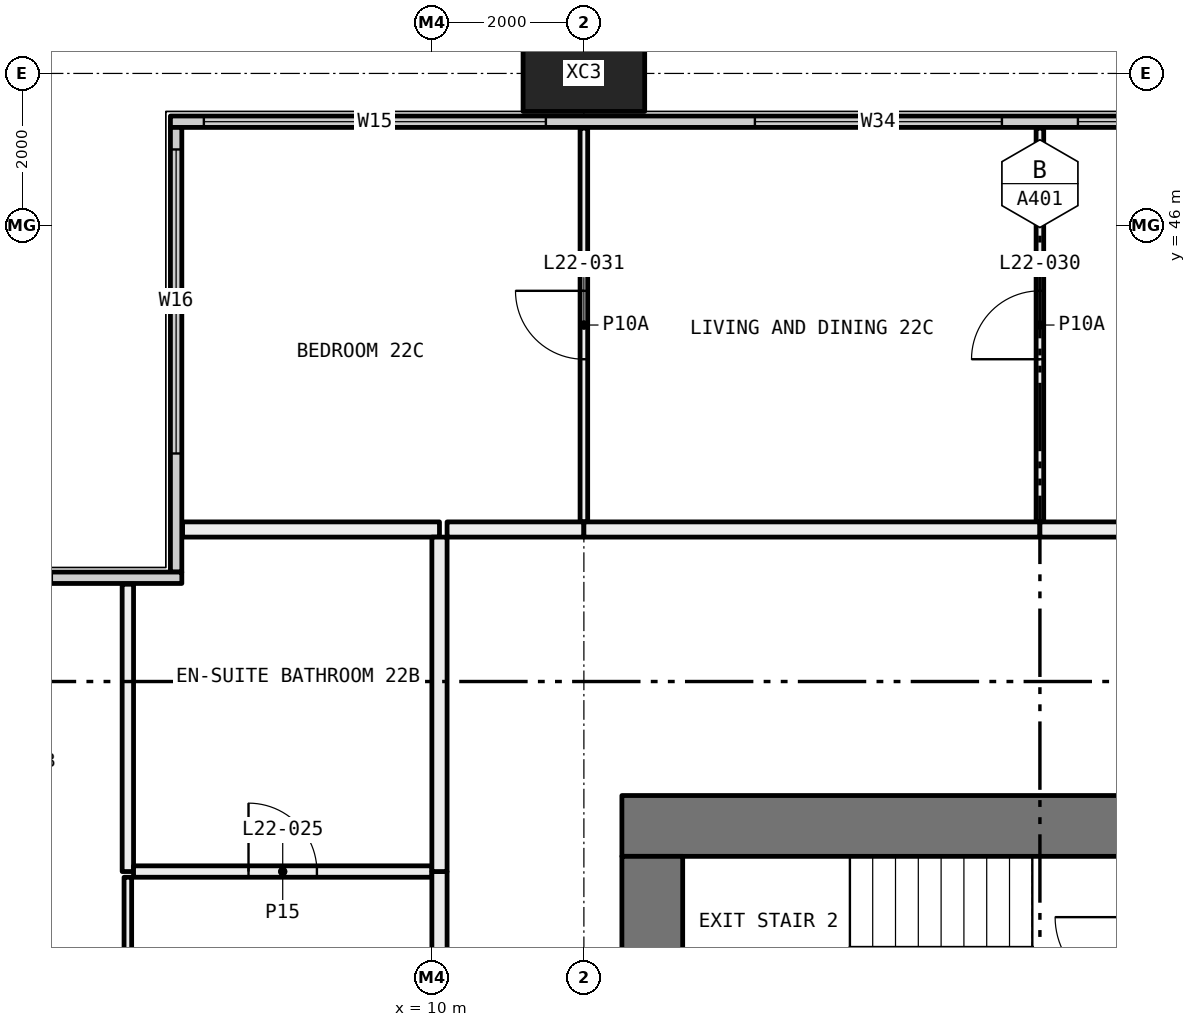
"""IFC4 building model, lengths in metres.
Left out: names, types, materials, properties, quantities, classifications, styles, units other than length and angle.
Written with IfcOpenShell. Run it as: python <this file> out.ifc"""

import sys

from ifc_helpers import new_model, si_unit, direction, frame, frame_2d, origin, origin_2d, place, context, subcontext, project, spatial, rectangle, hollow_rectangle, extrude, element, fill, save


model = new_model("IFC4")
c1 = context("Model", 3, precision=1e-05, world=origin(), true_north=direction((0.0, 1.0)))
c2 = subcontext(c1, "Body", "Model", "MODEL_VIEW")
j1 = project(units=[si_unit("LENGTHUNIT", "METRE"), si_unit("PLANEANGLEUNIT", "RADIAN")], contexts=[c1])
p1 = place(None, origin())
s1 = spatial("IfcSite", under=j1, at=p1, CompositionType="ELEMENT")
p2 = place(p1, origin())
s2 = spatial("IfcBuilding", under=s1, at=p2, CompositionType="ELEMENT")
p3 = place(p2, frame((0.0, 0.0, 88.65)))
s3 = spatial("IfcBuildingStorey", under=s2, at=p3, CompositionType="ELEMENT", Elevation=88.65)
p4 = place(p3, frame((12.0, 48.0, -0.4), z_axis=(0.0, 0.0, 1.0), x_axis=(1.0, 0.0, 0.0)))
e1 = element("IfcColumn", 1, at=p4, inside=s3, PredefinedType="COLUMN", context=c2, shape_type="SweptSolid", body=[
    extrude(hollow_rectangle(XDim=1.6, YDim=1.0, WallThickness=0.065, at=origin_2d()), origin(), (0.0, 0.0, 1.0), 3.45),
])
p5 = place(p3, frame((6.56, 47.365, 0.0), z_axis=(0.0, 0.0, 1.0), x_axis=(1.0, 0.0, 0.0)))
e2 = element("IfcWall", 2, at=p5, inside=s3, PredefinedType="ELEMENTEDWALL", context=c2, shape_type="SweptSolid", body=[
    extrude(rectangle(XDim=58.88, YDim=0.15, at=frame_2d((29.44, 0.0))), origin(), (0.0, 0.0, 1.0), 3.05),
])
p6 = place(p5, frame((0.44, 0.0, 0.45)))
e3 = element("IfcOpeningElement", 3, at=p6, cuts=e2, PredefinedType="OPENING", context=c2, shape_type="SweptSolid", body=[
    extrude(rectangle(XDim=4.5, YDim=2.55, at=frame_2d((2.25, 1.275))), frame((0.0, 0.085, 0.0), z_axis=(0.0, -1.0, 0.0), x_axis=(1.0, 0.0, 0.0)), (0.0, 0.0, 1.0), 0.17),
])
p7 = place(p5, frame((7.69, 0.0, 0.45)))
e4 = element("IfcOpeningElement", 4, at=p7, cuts=e2, PredefinedType="OPENING", context=c2, shape_type="SweptSolid", body=[
    extrude(rectangle(XDim=3.25, YDim=2.55, at=frame_2d((1.625, 1.275))), frame((0.0, 0.085, 0.0), z_axis=(0.0, -1.0, 0.0), x_axis=(1.0, 0.0, 0.0)), (0.0, 0.0, 1.0), 0.17),
])
p8 = place(p5, frame((11.94, 0.0, 0.45)))
e5 = element("IfcOpeningElement", 5, at=p8, cuts=e2, PredefinedType="OPENING", context=c2, shape_type="SweptSolid", body=[
    extrude(rectangle(XDim=3.25, YDim=2.55, at=frame_2d((1.625, 1.275))), frame((0.0, 0.085, 0.0), z_axis=(0.0, -1.0, 0.0), x_axis=(1.0, 0.0, 0.0)), (0.0, 0.0, 1.0), 0.17),
])
p9 = place(p5, frame((19.69, 0.0, 0.45)))
e6 = element("IfcOpeningElement", 6, at=p9, cuts=e2, PredefinedType="OPENING", context=c2, shape_type="SweptSolid", body=[
    extrude(rectangle(XDim=3.25, YDim=2.55, at=frame_2d((1.625, 1.275))), frame((0.0, 0.085, 0.0), z_axis=(0.0, -1.0, 0.0), x_axis=(1.0, 0.0, 0.0)), (0.0, 0.0, 1.0), 0.17),
])
p10 = place(p5, frame((23.94, 0.0, 0.45)))
e7 = element("IfcOpeningElement", 7, at=p10, cuts=e2, PredefinedType="OPENING", context=c2, shape_type="SweptSolid", body=[
    extrude(rectangle(XDim=2.0, YDim=2.55, at=frame_2d((1.0, 1.275))), frame((0.0, 0.085, 0.0), z_axis=(0.0, -1.0, 0.0), x_axis=(1.0, 0.0, 0.0)), (0.0, 0.0, 1.0), 0.17),
])
p11 = place(p5, frame((31.69, 0.0, 0.45)))
e8 = element("IfcOpeningElement", 8, at=p11, cuts=e2, PredefinedType="OPENING", context=c2, shape_type="SweptSolid", body=[
    extrude(rectangle(XDim=3.25, YDim=2.55, at=frame_2d((1.625, 1.275))), frame((0.0, 0.085, 0.0), z_axis=(0.0, -1.0, 0.0), x_axis=(1.0, 0.0, 0.0)), (0.0, 0.0, 1.0), 0.17),
])
p12 = place(p5, frame((35.94, 0.0, 0.45)))
e9 = element("IfcOpeningElement", 9, at=p12, cuts=e2, PredefinedType="OPENING", context=c2, shape_type="SweptSolid", body=[
    extrude(rectangle(XDim=3.25, YDim=2.55, at=frame_2d((1.625, 1.275))), frame((0.0, 0.085, 0.0), z_axis=(0.0, -1.0, 0.0), x_axis=(1.0, 0.0, 0.0)), (0.0, 0.0, 1.0), 0.17),
])
p13 = place(p5, frame((43.69, 0.0, 0.45)))
e10 = element("IfcOpeningElement", 10, at=p13, cuts=e2, PredefinedType="OPENING", context=c2, shape_type="SweptSolid", body=[
    extrude(rectangle(XDim=3.25, YDim=2.55, at=frame_2d((1.625, 1.275))), frame((0.0, 0.085, 0.0), z_axis=(0.0, -1.0, 0.0), x_axis=(1.0, 0.0, 0.0)), (0.0, 0.0, 1.0), 0.17),
])
p14 = place(p5, frame((47.94, 0.0, 0.45)))
e11 = element("IfcOpeningElement", 11, at=p14, cuts=e2, PredefinedType="OPENING", context=c2, shape_type="SweptSolid", body=[
    extrude(rectangle(XDim=2.0, YDim=2.55, at=frame_2d((1.0, 1.275))), frame((0.0, 0.085, 0.0), z_axis=(0.0, -1.0, 0.0), x_axis=(1.0, 0.0, 0.0)), (0.0, 0.0, 1.0), 0.17),
])
p15 = place(p5, frame((53.94, 0.0, 0.45)))
e12 = element("IfcOpeningElement", 12, at=p15, cuts=e2, PredefinedType="OPENING", context=c2, shape_type="SweptSolid", body=[
    extrude(rectangle(XDim=4.5, YDim=2.55, at=frame_2d((2.25, 1.275))), frame((0.0, 0.085, 0.0), z_axis=(0.0, -1.0, 0.0), x_axis=(1.0, 0.0, 0.0)), (0.0, 0.0, 1.0), 0.17),
])
p16 = place(p3, frame((6.635, 41.44, 0.0), z_axis=(0.0, 0.0, 1.0), x_axis=(0.0, 1.0, 0.0)))
e13 = element("IfcWall", 13, at=p16, inside=s3, PredefinedType="ELEMENTEDWALL", context=c2, shape_type="SweptSolid", body=[
    extrude(rectangle(XDim=5.85, YDim=0.15, at=frame_2d((2.925, 0.0))), origin(), (0.0, 0.0, 1.0), 3.05),
])
p17 = place(p16, frame((1.56, 0.0, 0.45)))
e14 = element("IfcOpeningElement", 14, at=p17, cuts=e13, PredefinedType="OPENING", context=c2, shape_type="SweptSolid", body=[
    extrude(rectangle(XDim=4.0, YDim=2.55, at=frame_2d((2.0, 1.275))), frame((0.0, 0.085, 0.0), z_axis=(0.0, -1.0, 0.0), x_axis=(1.0, 0.0, 0.0)), (0.0, 0.0, 1.0), 0.17),
])
p18 = place(p3, frame((0.56, 41.365, 0.0), z_axis=(0.0, 0.0, 1.0), x_axis=(1.0, 0.0, 0.0)))
e15 = element("IfcWall", 15, at=p18, inside=s3, PredefinedType="ELEMENTEDWALL", context=c2, shape_type="SweptSolid", body=[
    extrude(rectangle(XDim=6.15, YDim=0.15, at=frame_2d((3.075, 0.0))), origin(), (0.0, 0.0, 1.0), 3.05),
])
p19 = place(p18, frame((0.44, 0.0, 0.45)))
e16 = element("IfcOpeningElement", 16, at=p19, cuts=e15, PredefinedType="OPENING", context=c2, shape_type="SweptSolid", body=[
    extrude(rectangle(XDim=4.0, YDim=2.55, at=frame_2d((2.0, 1.275))), frame((0.0, 0.085, 0.0), z_axis=(0.0, -1.0, 0.0), x_axis=(1.0, 0.0, 0.0)), (0.0, 0.0, 1.0), 0.17),
])
p20 = place(p3, frame((6.0, 36.05, 0.0), z_axis=(0.0, 0.0, 1.0), x_axis=(0.0, 1.0, 0.0)))
e17 = element("IfcWall", 17, at=p20, inside=s3, PredefinedType="PARTITIONING", context=c2, shape_type="SweptSolid", body=[
    extrude(rectangle(XDim=1.375, YDim=0.1, at=frame_2d((0.688, 0.0))), origin(), (0.0, 0.0, 1.0), 2.45),
])
p21 = place(p3, frame((6.0, 37.5, 0.0), z_axis=(0.0, 0.0, 1.0), x_axis=(0.0, 1.0, 0.0)))
e18 = element("IfcWall", 18, at=p21, inside=s3, PredefinedType="PARTITIONING", context=c2, shape_type="SweptSolid", body=[
    extrude(rectangle(XDim=3.78, YDim=0.15, at=frame_2d((1.89, 0.0))), origin(), (0.0, 0.0, 1.0), 3.05),
])
p22 = place(p3, frame((10.0, 37.5, 0.0), z_axis=(0.0, 0.0, 1.0), x_axis=(-1.0, 0.0, 0.0)))
e19 = element("IfcWall", 19, at=p22, inside=s3, PredefinedType="PARTITIONING", context=c2, shape_type="SweptSolid", body=[
    extrude(rectangle(XDim=3.925, YDim=0.15, at=frame_2d((1.962, 0.0))), origin(), (0.0, 0.0, 1.0), 3.05),
])
p23 = place(p22, frame((1.512, 0.0, 0.0)))
e20 = element("IfcOpeningElement", 20, at=p23, cuts=e19, PredefinedType="OPENING", context=c2, shape_type="SweptSolid", body=[
    extrude(rectangle(XDim=0.9, YDim=2.1, at=frame_2d((0.45, 1.05))), frame((0.0, 0.085, 0.0), z_axis=(0.0, -1.0, 0.0), x_axis=(1.0, 0.0, 0.0)), (0.0, 0.0, 1.0), 0.17),
])
p24 = place(p3, frame((10.1, 36.1, 0.0), z_axis=(0.0, 0.0, 1.0), x_axis=(0.0, 1.0, 0.0)))
e21 = element("IfcWall", 21, at=p24, inside=s3, PredefinedType="PARTITIONING", context=c2, shape_type="SweptSolid", body=[
    extrude(rectangle(XDim=1.4, YDim=0.2, at=frame_2d((0.7, 0.0))), origin(), (0.0, 0.0, 1.0), 3.05),
])
p25 = place(p3, frame((10.1, 42.0, 0.0), z_axis=(0.0, 0.0, 1.0), x_axis=(-1.0, 0.0, 0.0)))
e22 = element("IfcWall", 22, at=p25, inside=s3, PredefinedType="PARTITIONING", context=c2, shape_type="SweptSolid", body=[
    extrude(rectangle(XDim=3.38, YDim=0.2, at=frame_2d((1.69, 0.0))), origin(), (0.0, 0.0, 1.0), 3.05),
])
p26 = place(p3, frame((10.1, 37.5, 0.0), z_axis=(0.0, 0.0, 1.0), x_axis=(0.0, 1.0, 0.0)))
e23 = element("IfcWall", 23, at=p26, inside=s3, PredefinedType="PARTITIONING", context=c2, shape_type="SweptSolid", body=[
    extrude(rectangle(XDim=4.4, YDim=0.2, at=frame_2d((2.2, 0.0))), origin(), (0.0, 0.0, 1.0), 3.05),
])
p27 = place(p3, frame((12.0, 42.1, 0.0), z_axis=(0.0, 0.0, 1.0), x_axis=(0.0, 1.0, 0.0)))
e24 = element("IfcWall", 24, at=p27, inside=s3, PredefinedType="PARTITIONING", context=c2, shape_type="SweptSolid", body=[
    extrude(rectangle(XDim=5.18, YDim=0.1, at=frame_2d((2.59, 0.0))), origin(), (0.0, 0.0, 1.0), 3.05),
])
p28 = place(p27, frame((2.14, 0.0, 0.0)))
e25 = element("IfcOpeningElement", 25, at=p28, cuts=e24, PredefinedType="OPENING", context=c2, shape_type="SweptSolid", body=[
    extrude(rectangle(XDim=0.9, YDim=2.1, at=frame_2d((0.45, 1.05))), frame((0.0, 0.06, 0.0), z_axis=(0.0, -1.0, 0.0), x_axis=(1.0, 0.0, 0.0)), (0.0, 0.0, 1.0), 0.12),
])
p29 = place(p3, frame((10.2, 42.0, 0.0), z_axis=(0.0, 0.0, 1.0), x_axis=(1.0, 0.0, 0.0)))
e26 = element("IfcWall", 26, at=p29, inside=s3, PredefinedType="PARTITIONING", context=c2, shape_type="SweptSolid", body=[
    extrude(rectangle(XDim=1.8, YDim=0.2, at=frame_2d((0.9, 0.0))), origin(), (0.0, 0.0, 1.0), 3.05),
])
p30 = place(p3, frame((18.0, 42.1, 0.0), z_axis=(0.0, 0.0, 1.0), x_axis=(0.0, 1.0, 0.0)))
e27 = element("IfcWall", 27, at=p30, inside=s3, PredefinedType="PARTITIONING", context=c2, shape_type="SweptSolid", body=[
    extrude(rectangle(XDim=5.18, YDim=0.1, at=frame_2d((2.59, 0.0))), origin(), (0.0, 0.0, 1.0), 3.05),
])
p31 = place(p30, frame((2.14, 0.0, 0.0)))
e28 = element("IfcOpeningElement", 28, at=p31, cuts=e27, PredefinedType="OPENING", context=c2, shape_type="SweptSolid", body=[
    extrude(rectangle(XDim=0.9, YDim=2.1, at=frame_2d((0.45, 1.05))), frame((0.0, 0.06, 0.0), z_axis=(0.0, -1.0, 0.0), x_axis=(1.0, 0.0, 0.0)), (0.0, 0.0, 1.0), 0.12),
])
p32 = place(p3, frame((12.0, 42.0, 0.0), z_axis=(0.0, 0.0, 1.0), x_axis=(1.0, 0.0, 0.0)))
e29 = element("IfcWall", 29, at=p32, inside=s3, PredefinedType="PARTITIONING", context=c2, shape_type="SweptSolid", body=[
    extrude(rectangle(XDim=6.0, YDim=0.2, at=frame_2d((3.0, 0.0))), origin(), (0.0, 0.0, 1.0), 3.05),
])
p33 = place(p3, frame((18.0, 42.0, 0.0), z_axis=(0.0, 0.0, 1.0), x_axis=(1.0, 0.0, 0.0)))
e30 = element("IfcWall", 30, at=p33, inside=s3, PredefinedType="PARTITIONING", context=c2, shape_type="SweptSolid", body=[
    extrude(rectangle(XDim=6.0, YDim=0.2, at=frame_2d((3.0, 0.0))), origin(), (0.0, 0.0, 1.0), 3.05),
])
p34 = place(p33, frame((2.5, 0.0, 0.0)))
e31 = element("IfcOpeningElement", 31, at=p34, cuts=e30, PredefinedType="OPENING", context=c2, shape_type="SweptSolid", body=[
    extrude(rectangle(XDim=1.0, YDim=2.1, at=frame_2d((0.5, 1.05))), frame((0.0, 0.11, 0.0), z_axis=(0.0, -1.0, 0.0), x_axis=(1.0, 0.0, 0.0)), (0.0, 0.0, 1.0), 0.22),
])
p35 = place(p3, frame((12.5, 38.1, 0.0), z_axis=(0.0, 0.0, 1.0), x_axis=(1.0, 0.0, 0.0)))
e32 = element("IfcWall", 32, at=p35, inside=s3, PredefinedType="SHEAR", context=c2, shape_type="SweptSolid", body=[
    extrude(rectangle(XDim=11.0, YDim=0.8, at=frame_2d((5.5, 0.0))), origin(), (0.0, 0.0, 1.0), 3.05),
])
p36 = place(p35, frame((8.4, 0.0, 0.0)))
e33 = element("IfcOpeningElement", 33, at=p36, cuts=e32, PredefinedType="OPENING", context=c2, shape_type="SweptSolid", body=[
    extrude(rectangle(XDim=1.6, YDim=2.1, at=frame_2d((0.8, 1.05))), frame((0.0, 0.41, 0.0), z_axis=(0.0, -1.0, 0.0), x_axis=(1.0, 0.0, 0.0)), (0.0, 0.0, 1.0), 0.82),
])
p37 = place(p3, frame((12.9, 22.3, 0.0), z_axis=(0.0, 0.0, 1.0), x_axis=(0.0, 1.0, 0.0)))
e34 = element("IfcWall", 34, at=p37, inside=s3, PredefinedType="SHEAR", context=c2, shape_type="SweptSolid", body=[
    extrude(rectangle(XDim=15.4, YDim=0.8, at=frame_2d((7.7, 0.0))), origin(), (0.0, 0.0, 1.0), 3.05),
])
p38 = place(p37, frame((8.15, 0.0, 0.0)))
e35 = element("IfcOpeningElement", 35, at=p38, cuts=e34, PredefinedType="OPENING", context=c2, shape_type="SweptSolid", body=[
    extrude(rectangle(XDim=1.6, YDim=2.1, at=frame_2d((0.8, 1.05))), frame((0.0, 0.41, 0.0), z_axis=(0.0, -1.0, 0.0), x_axis=(1.0, 0.0, 0.0)), (0.0, 0.0, 1.0), 0.82),
])
p39 = place(p37, frame((2.05, 0.0, 0.0)))
e36 = element("IfcOpeningElement", 36, at=p39, cuts=e34, PredefinedType="OPENING", context=c2, shape_type="SweptSolid", body=[
    extrude(rectangle(XDim=1.0, YDim=2.1, at=frame_2d((0.5, 1.05))), frame((0.0, 0.41, 0.0), z_axis=(0.0, -1.0, 0.0), x_axis=(1.0, 0.0, 0.0)), (0.0, 0.0, 1.0), 0.82),
])
p40 = place(p6, origin())
e37 = element("IfcWindow", 37, at=p40, inside=s3, PartitioningType="SINGLE_PANEL", PredefinedType="WINDOW", context=c2, shape_type="SweptSolid", body=[
    extrude(rectangle(XDim=4.5, YDim=2.55, at=frame_2d((2.25, 1.275))), frame((0.0, 0.03, 0.0), z_axis=(0.0, -1.0, 0.0), x_axis=(1.0, 0.0, 0.0)), (0.0, 0.0, 1.0), 0.06),
])
fill(e3, e37)
p41 = place(p7, origin())
e38 = element("IfcWindow", 38, at=p41, inside=s3, PartitioningType="SINGLE_PANEL", PredefinedType="WINDOW", context=c2, shape_type="SweptSolid", body=[
    extrude(rectangle(XDim=3.25, YDim=2.55, at=frame_2d((1.625, 1.275))), frame((0.0, 0.03, 0.0), z_axis=(0.0, -1.0, 0.0), x_axis=(1.0, 0.0, 0.0)), (0.0, 0.0, 1.0), 0.06),
])
fill(e4, e38)
p42 = place(p8, origin())
e39 = element("IfcWindow", 39, at=p42, inside=s3, PartitioningType="SINGLE_PANEL", PredefinedType="WINDOW", context=c2, shape_type="SweptSolid", body=[
    extrude(rectangle(XDim=3.25, YDim=2.55, at=frame_2d((1.625, 1.275))), frame((0.0, 0.03, 0.0), z_axis=(0.0, -1.0, 0.0), x_axis=(1.0, 0.0, 0.0)), (0.0, 0.0, 1.0), 0.06),
])
fill(e5, e39)
p43 = place(p17, origin())
e40 = element("IfcWindow", 40, at=p43, inside=s3, PartitioningType="SINGLE_PANEL", PredefinedType="WINDOW", context=c2, shape_type="SweptSolid", body=[
    extrude(rectangle(XDim=4.0, YDim=2.55, at=frame_2d((2.0, 1.275))), frame((0.0, 0.03, 0.0), z_axis=(0.0, -1.0, 0.0), x_axis=(1.0, 0.0, 0.0)), (0.0, 0.0, 1.0), 0.06),
])
fill(e14, e40)
p44 = place(p23, frame((0.9, 0.0, 0.0), x_axis=(-1.0, 0.0, 0.0)))
e41 = element("IfcDoor", 41, at=p44, inside=s3, OperationType="SINGLE_SWING_RIGHT", PredefinedType="DOOR", context=c2, shape_type="SweptSolid", body=[
    extrude(rectangle(XDim=0.9, YDim=2.1, at=frame_2d((0.45, 1.05))), frame((0.0, 0.025, 0.0), z_axis=(0.0, -1.0, 0.0), x_axis=(1.0, 0.0, 0.0)), (0.0, 0.0, 1.0), 0.05),
])
fill(e20, e41)
p45 = place(p31, origin())
e42 = element("IfcDoor", 42, at=p45, inside=s3, OperationType="SINGLE_SWING_RIGHT", PredefinedType="DOOR", context=c2, shape_type="SweptSolid", body=[
    extrude(rectangle(XDim=0.9, YDim=2.1, at=frame_2d((0.45, 1.05))), frame((0.0, 0.025, 0.0), z_axis=(0.0, -1.0, 0.0), x_axis=(1.0, 0.0, 0.0)), (0.0, 0.0, 1.0), 0.05),
])
fill(e28, e42)
p46 = place(p28, origin())
e43 = element("IfcDoor", 43, at=p46, inside=s3, OperationType="SINGLE_SWING_LEFT", PredefinedType="DOOR", context=c2, shape_type="SweptSolid", body=[
    extrude(rectangle(XDim=0.9, YDim=2.1, at=frame_2d((0.45, 1.05))), frame((0.0, 0.025, 0.0), z_axis=(0.0, -1.0, 0.0), x_axis=(1.0, 0.0, 0.0)), (0.0, 0.0, 1.0), 0.05),
])
fill(e25, e43)
save(model, sys.argv[1])
